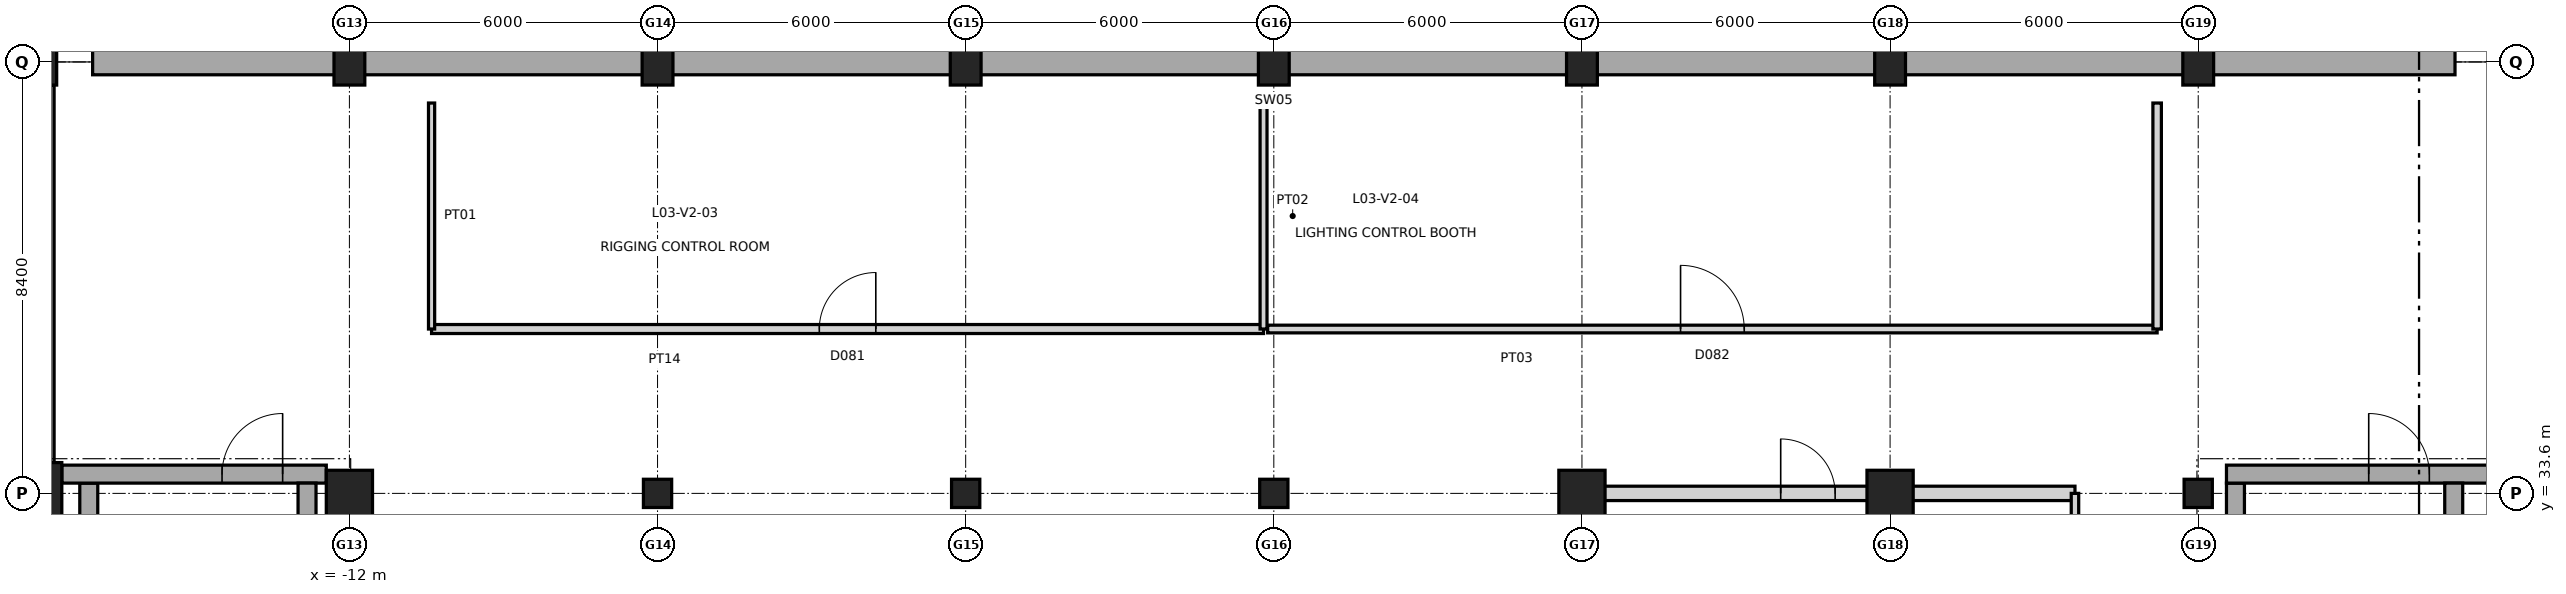
"""IFC4 building model, lengths in metres.
Left out: names, types, materials, properties, quantities, classifications, styles, units other than length and angle.
Written with IfcOpenShell. Run it as: python <this file> out.ifc"""

import sys

from ifc_helpers import new_model, si_unit, direction, frame, frame_2d, origin, origin_2d, place, context, subcontext, project, spatial, rectangle, extrude, element, fill, save


model = new_model("IFC4")
c1 = context("Model", 3, precision=1e-05, world=origin(), true_north=direction((0.0, 1.0)))
c2 = subcontext(c1, "Body", "Model", "MODEL_VIEW")
j1 = project(units=[si_unit("LENGTHUNIT", "METRE"), si_unit("PLANEANGLEUNIT", "RADIAN")], contexts=[c1])
p1 = place(None, origin())
s1 = spatial("IfcSite", under=j1, at=p1, CompositionType="ELEMENT")
p2 = place(p1, origin())
s2 = spatial("IfcBuilding", under=s1, at=p2, CompositionType="ELEMENT")
p3 = place(p2, frame((0.0, 0.0, 15.0)))
s3 = spatial("IfcBuildingStorey", under=s2, at=p3, CompositionType="ELEMENT", Elevation=15.0)
p4 = place(p3, frame((-18.0, 33.6, 0.0), z_axis=(0.0, 0.0, 1.0), x_axis=(1.0, 0.0, 0.0)))
e1 = element("IfcColumn", 1, at=p4, inside=s3, PredefinedType="COLUMN", context=c2, shape_type="SweptSolid", body=[
    extrude(rectangle(XDim=0.8, YDim=1.2, at=origin_2d()), origin(), (0.0, 0.0, 1.0), 4.8),
])
p5 = place(p3, frame((-18.0, 42.0, 0.0), z_axis=(0.0, 0.0, 1.0), x_axis=(1.0, 0.0, 0.0)))
e2 = element("IfcColumn", 2, at=p5, inside=s3, PredefinedType="COLUMN", context=c2, shape_type="SweptSolid", body=[
    extrude(rectangle(XDim=0.6, YDim=0.9, at=origin_2d()), origin(), (0.0, 0.0, 1.0), 4.8),
])
p6 = place(p3, frame((-12.0, 33.6, 0.0), z_axis=(0.0, 0.0, 1.0), x_axis=(1.0, 0.0, 0.0)))
e3 = element("IfcColumn", 3, at=p6, inside=s3, PredefinedType="COLUMN", context=c2, shape_type="SweptSolid", body=[
    extrude(rectangle(XDim=0.9, YDim=0.9, at=origin_2d()), origin(), (0.0, 0.0, 1.0), 4.8),
])
p7 = place(p3, frame((-12.0, 42.0, 0.0), z_axis=(0.0, 0.0, 1.0), x_axis=(1.0, 0.0, 0.0)))
e4 = element("IfcColumn", 4, at=p7, inside=s3, PredefinedType="COLUMN", context=c2, shape_type="SweptSolid", body=[
    extrude(rectangle(XDim=0.6, YDim=0.9, at=origin_2d()), origin(), (0.0, 0.0, 1.0), 4.8),
])
p8 = place(p3, frame((-6.0, 33.6, 0.0), z_axis=(0.0, 0.0, 1.0), x_axis=(1.0, 0.0, 0.0)))
e5 = element("IfcColumn", 5, at=p8, inside=s3, PredefinedType="COLUMN", context=c2, shape_type="SweptSolid", body=[
    extrude(rectangle(XDim=0.55, YDim=0.55, at=origin_2d()), origin(), (0.0, 0.0, 1.0), 4.8),
])
p9 = place(p3, frame((-6.0, 42.0, 0.0), z_axis=(0.0, 0.0, 1.0), x_axis=(1.0, 0.0, 0.0)))
e6 = element("IfcColumn", 6, at=p9, inside=s3, PredefinedType="COLUMN", context=c2, shape_type="SweptSolid", body=[
    extrude(rectangle(XDim=0.6, YDim=0.9, at=origin_2d()), origin(), (0.0, 0.0, 1.0), 4.8),
])
p10 = place(p3, frame((0.0, 33.6, 0.0), z_axis=(0.0, 0.0, 1.0), x_axis=(1.0, 0.0, 0.0)))
e7 = element("IfcColumn", 7, at=p10, inside=s3, PredefinedType="COLUMN", context=c2, shape_type="SweptSolid", body=[
    extrude(rectangle(XDim=0.55, YDim=0.55, at=origin_2d()), origin(), (0.0, 0.0, 1.0), 4.8),
])
p11 = place(p3, frame((0.0, 42.0, 0.0), z_axis=(0.0, 0.0, 1.0), x_axis=(1.0, 0.0, 0.0)))
e8 = element("IfcColumn", 8, at=p11, inside=s3, PredefinedType="COLUMN", context=c2, shape_type="SweptSolid", body=[
    extrude(rectangle(XDim=0.6, YDim=0.9, at=origin_2d()), origin(), (0.0, 0.0, 1.0), 4.8),
])
p12 = place(p3, frame((6.0, 33.6, 0.0), z_axis=(0.0, 0.0, 1.0), x_axis=(1.0, 0.0, 0.0)))
e9 = element("IfcColumn", 9, at=p12, inside=s3, PredefinedType="COLUMN", context=c2, shape_type="SweptSolid", body=[
    extrude(rectangle(XDim=0.55, YDim=0.55, at=origin_2d()), origin(), (0.0, 0.0, 1.0), 4.8),
])
p13 = place(p3, frame((6.0, 42.0, 0.0), z_axis=(0.0, 0.0, 1.0), x_axis=(1.0, 0.0, 0.0)))
e10 = element("IfcColumn", 10, at=p13, inside=s3, PredefinedType="COLUMN", context=c2, shape_type="SweptSolid", body=[
    extrude(rectangle(XDim=0.6, YDim=0.9, at=origin_2d()), origin(), (0.0, 0.0, 1.0), 4.8),
])
p14 = place(p3, frame((12.0, 33.6, 0.0), z_axis=(0.0, 0.0, 1.0), x_axis=(1.0, 0.0, 0.0)))
e11 = element("IfcColumn", 11, at=p14, inside=s3, PredefinedType="COLUMN", context=c2, shape_type="SweptSolid", body=[
    extrude(rectangle(XDim=0.9, YDim=0.9, at=origin_2d()), origin(), (0.0, 0.0, 1.0), 4.8),
])
p15 = place(p3, frame((12.0, 42.0, 0.0), z_axis=(0.0, 0.0, 1.0), x_axis=(1.0, 0.0, 0.0)))
e12 = element("IfcColumn", 12, at=p15, inside=s3, PredefinedType="COLUMN", context=c2, shape_type="SweptSolid", body=[
    extrude(rectangle(XDim=0.6, YDim=0.9, at=origin_2d()), origin(), (0.0, 0.0, 1.0), 4.8),
])
p16 = place(p3, frame((18.0, 33.6, 0.0), z_axis=(0.0, 0.0, 1.0), x_axis=(1.0, 0.0, 0.0)))
e13 = element("IfcColumn", 13, at=p16, inside=s3, PredefinedType="COLUMN", context=c2, shape_type="SweptSolid", body=[
    extrude(rectangle(XDim=0.9, YDim=0.9, at=origin_2d()), origin(), (0.0, 0.0, 1.0), 4.8),
])
p17 = place(p3, frame((18.0, 42.0, 0.0), z_axis=(0.0, 0.0, 1.0), x_axis=(1.0, 0.0, 0.0)))
e14 = element("IfcColumn", 14, at=p17, inside=s3, PredefinedType="COLUMN", context=c2, shape_type="SweptSolid", body=[
    extrude(rectangle(XDim=0.6, YDim=0.9, at=origin_2d()), origin(), (0.0, 0.0, 1.0), 4.8),
])
p18 = place(p3, frame((24.0, 33.6, 0.0), z_axis=(0.0, 0.0, 1.0), x_axis=(1.0, 0.0, 0.0)))
e15 = element("IfcColumn", 15, at=p18, inside=s3, PredefinedType="COLUMN", context=c2, shape_type="SweptSolid", body=[
    extrude(rectangle(XDim=0.55, YDim=0.55, at=origin_2d()), origin(), (0.0, 0.0, 1.0), 4.8),
])
p19 = place(p3, frame((24.0, 42.0, 0.0), z_axis=(0.0, 0.0, 1.0), x_axis=(1.0, 0.0, 0.0)))
e16 = element("IfcColumn", 16, at=p19, inside=s3, PredefinedType="COLUMN", context=c2, shape_type="SweptSolid", body=[
    extrude(rectangle(XDim=0.6, YDim=0.9, at=origin_2d()), origin(), (0.0, 0.0, 1.0), 4.8),
])
p20 = place(p3, frame((-18.0, 18.0, 0.0), z_axis=(0.0, 0.0, 1.0), x_axis=(0.0, 1.0, 0.0)))
e17 = element("IfcWall", 17, at=p20, inside=s3, PredefinedType="SHEAR", context=c2, shape_type="SweptSolid", body=[
    extrude(rectangle(XDim=23.55, YDim=0.5, at=frame_2d((11.775, 0.0))), origin(), (0.0, 0.0, 1.0), 4.8),
])
p21 = place(p3, frame((-17.0, 42.0, 0.0), z_axis=(0.0, 0.0, 1.0), x_axis=(1.0, 0.0, 0.0)))
e18 = element("IfcWall", 18, at=p21, inside=s3, PredefinedType="SHEAR", context=c2, shape_type="SweptSolid", body=[
    extrude(rectangle(XDim=46.0, YDim=0.5, at=frame_2d((23.0, 0.0))), origin(), (0.0, 0.0, 1.0), 4.8),
])
p22 = place(p3, frame((-17.075, 25.5, 0.0), z_axis=(0.0, 0.0, 1.0), x_axis=(0.0, 1.0, 0.0)))
e19 = element("IfcWall", 19, at=p22, inside=s3, PredefinedType="SHEAR", context=c2, shape_type="SweptSolid", body=[
    extrude(rectangle(XDim=8.3, YDim=0.35, at=frame_2d((4.15, 0.0))), origin(), (0.0, 0.0, 1.0), 4.8),
])
p23 = place(p3, frame((-17.6, 33.975, 0.0), z_axis=(0.0, 0.0, 1.0), x_axis=(1.0, 0.0, 0.0)))
e20 = element("IfcWall", 20, at=p23, inside=s3, PredefinedType="SHEAR", context=c2, shape_type="SweptSolid", body=[
    extrude(rectangle(XDim=5.15, YDim=0.35, at=frame_2d((2.575, 0.0))), origin(), (0.0, 0.0, 1.0), 4.8),
])
p24 = place(p23, frame((3.12, 0.0, 0.0)))
e21 = element("IfcOpeningElement", 21, at=p24, cuts=e20, PredefinedType="OPENING", context=c2, shape_type="SweptSolid", body=[
    extrude(rectangle(XDim=1.18, YDim=2.15, at=frame_2d((0.59, 1.075))), frame((0.0, 0.185, 0.0), z_axis=(0.0, -1.0, 0.0), x_axis=(1.0, 0.0, 0.0)), (0.0, 0.0, 1.0), 0.37),
])
for number, where, z_axis, x_axis in (
    (22, (-12.825, 33.8, 0.0), (0.0, 0.0, 1.0), (0.0, -1.0, 0.0)),
    (23, (24.725, 25.5, 0.0), (0.0, 0.0, 1.0), (0.0, 1.0, 0.0)),
):
    element("IfcWall", number, at=place(p3, frame(where, z_axis=z_axis, x_axis=x_axis)), inside=s3, PredefinedType="SHEAR", context=c2, shape_type="SweptSolid", body=[
        extrude(rectangle(XDim=8.3, YDim=0.35, at=frame_2d((4.15, 0.0))), origin(), (0.0, 0.0, 1.0), 4.8),
    ])
p25 = place(p3, frame((24.55, 33.975, 0.0), z_axis=(0.0, 0.0, 1.0), x_axis=(1.0, 0.0, 0.0)))
e24 = element("IfcWall", 24, at=p25, inside=s3, PredefinedType="SHEAR", context=c2, shape_type="SweptSolid", body=[
    extrude(rectangle(XDim=5.15, YDim=0.35, at=frame_2d((2.575, 0.0))), origin(), (0.0, 0.0, 1.0), 4.8),
])
p26 = place(p25, frame((2.77, 0.0, 0.0)))
e25 = element("IfcOpeningElement", 25, at=p26, cuts=e24, PredefinedType="OPENING", context=c2, shape_type="SweptSolid", body=[
    extrude(rectangle(XDim=1.18, YDim=2.15, at=frame_2d((0.59, 1.075))), frame((0.0, 0.185, 0.0), z_axis=(0.0, -1.0, 0.0), x_axis=(1.0, 0.0, 0.0)), (0.0, 0.0, 1.0), 0.37),
])
p27 = place(p3, frame((28.975, 33.8, 0.0), z_axis=(0.0, 0.0, 1.0), x_axis=(0.0, -1.0, 0.0)))
e26 = element("IfcWall", 26, at=p27, inside=s3, PredefinedType="SHEAR", context=c2, shape_type="SweptSolid", body=[
    extrude(rectangle(XDim=8.3, YDim=0.35, at=frame_2d((4.15, 0.0))), origin(), (0.0, 0.0, 1.0), 4.8),
])
p28 = place(p3, frame((12.0, 33.6, 0.0), z_axis=(0.0, 0.0, 1.0), x_axis=(1.0, 0.0, 0.0)))
e27 = element("IfcWall", 27, at=p28, inside=s3, PredefinedType="PARTITIONING", context=c2, shape_type="SweptSolid", body=[
    extrude(rectangle(XDim=9.6, YDim=0.28, at=frame_2d((4.8, 0.0))), origin(), (0.0, 0.0, 1.0), 3.34),
])
p29 = place(p28, frame((3.87, 0.0, 0.0)))
e28 = element("IfcOpeningElement", 28, at=p29, cuts=e27, PredefinedType="OPENING", context=c2, shape_type="SweptSolid", body=[
    extrude(rectangle(XDim=1.06, YDim=2.15, at=frame_2d((0.53, 1.075))), frame((0.0, 0.15, 0.0), z_axis=(0.0, -1.0, 0.0), x_axis=(1.0, 0.0, 0.0)), (0.0, 0.0, 1.0), 0.3),
])
p30 = place(p3, frame((12.0, 24.2, 0.0), z_axis=(0.0, 0.0, 1.0), x_axis=(0.0, 1.0, 0.0)))
e29 = element("IfcWall", 29, at=p30, inside=s3, PredefinedType="PARTITIONING", context=c2, shape_type="SweptSolid", body=[
    extrude(rectangle(XDim=9.4, YDim=0.305, at=frame_2d((4.7, 0.0))), origin(), (0.0, 0.0, 1.0), 3.59),
])
p31 = place(p3, frame((21.6, 24.2, 0.0), z_axis=(0.0, 0.0, 1.0), x_axis=(0.0, 1.0, 0.0)))
e30 = element("IfcWall", 30, at=p31, inside=s3, PredefinedType="PARTITIONING", context=c2, shape_type="SweptSolid", body=[
    extrude(rectangle(XDim=9.4, YDim=0.145, at=frame_2d((4.7, 0.0))), origin(), (0.0, 0.0, 1.0), 4.42),
])
p32 = place(p3, frame((-10.4, 36.8, 0.0), z_axis=(0.0, 0.0, 1.0), x_axis=(1.0, 0.0, 0.0)))
e31 = element("IfcWall", 31, at=p32, inside=s3, PredefinedType="PARTITIONING", context=c2, shape_type="SweptSolid", body=[
    extrude(rectangle(XDim=16.2, YDim=0.175, at=frame_2d((8.1, 0.0))), origin(), (0.0, 0.0, 1.0), 4.42),
])
p33 = place(p32, frame((7.55, 0.0, 0.0)))
e32 = element("IfcOpeningElement", 32, at=p33, cuts=e31, PredefinedType="OPENING", context=c2, shape_type="SweptSolid", body=[
    extrude(rectangle(XDim=1.1, YDim=2.2, at=frame_2d((0.55, 1.1))), frame((0.0, 0.097, 0.0), z_axis=(0.0, -1.0, 0.0), x_axis=(1.0, 0.0, 0.0)), (0.0, 0.0, 1.0), 0.195),
])
p34 = place(p3, frame((-10.4, 36.8, 0.0), z_axis=(0.0, 0.0, 1.0), x_axis=(0.0, 1.0, 0.0)))
e33 = element("IfcWall", 33, at=p34, inside=s3, PredefinedType="PARTITIONING", context=c2, shape_type="SweptSolid", body=[
    extrude(rectangle(XDim=4.4, YDim=0.12, at=frame_2d((2.2, 0.0))), origin(), (0.0, 0.0, 1.0), 4.42),
])
p35 = place(p3, frame((5.8, 36.8, 0.0), z_axis=(0.0, 0.0, 1.0), x_axis=(0.0, 1.0, 0.0)))
e34 = element("IfcWall", 34, at=p35, inside=s3, PredefinedType="PARTITIONING", context=c2, shape_type="SweptSolid", body=[
    extrude(rectangle(XDim=4.4, YDim=0.135, at=frame_2d((2.2, 0.0))), origin(), (0.0, 0.0, 1.0), 3.734),
])
p36 = place(p3, frame((5.88, 36.8, 0.0), z_axis=(0.0, 0.0, 1.0), x_axis=(1.0, 0.0, 0.0)))
e35 = element("IfcWall", 35, at=p36, inside=s3, PredefinedType="PARTITIONING", context=c2, shape_type="SweptSolid", body=[
    extrude(rectangle(XDim=17.32, YDim=0.15, at=frame_2d((8.66, 0.0))), origin(), (0.0, 0.0, 1.0), 4.42),
])
p37 = place(p36, frame((8.04, 0.0, 0.0)))
e36 = element("IfcOpeningElement", 36, at=p37, cuts=e35, PredefinedType="OPENING", context=c2, shape_type="SweptSolid", body=[
    extrude(rectangle(XDim=1.24, YDim=2.2, at=frame_2d((0.62, 1.1))), frame((0.0, 0.085, 0.0), z_axis=(0.0, -1.0, 0.0), x_axis=(1.0, 0.0, 0.0)), (0.0, 0.0, 1.0), 0.17),
])
p38 = place(p3, frame((23.2, 36.8, 0.0), z_axis=(0.0, 0.0, 1.0), x_axis=(0.0, 1.0, 0.0)))
e37 = element("IfcWall", 37, at=p38, inside=s3, PredefinedType="PARTITIONING", context=c2, shape_type="SweptSolid", body=[
    extrude(rectangle(XDim=4.4, YDim=0.165, at=frame_2d((2.2, 0.0))), origin(), (0.0, 0.0, 1.0), 4.42),
])
p39 = place(p24, origin())
e38 = element("IfcDoor", 38, at=p39, inside=s3, OperationType="SINGLE_SWING_RIGHT", PredefinedType="DOOR", context=c2, shape_type="SweptSolid", body=[
    extrude(rectangle(XDim=1.18, YDim=2.15, at=frame_2d((0.59, 1.075))), frame((0.0, 0.025, 0.0), z_axis=(0.0, -1.0, 0.0), x_axis=(1.0, 0.0, 0.0)), (0.0, 0.0, 1.0), 0.05),
])
fill(e21, e38)
p40 = place(p26, origin())
e39 = element("IfcDoor", 39, at=p40, inside=s3, OperationType="SINGLE_SWING_LEFT", PredefinedType="DOOR", context=c2, shape_type="SweptSolid", body=[
    extrude(rectangle(XDim=1.18, YDim=2.15, at=frame_2d((0.59, 1.075))), frame((0.0, 0.025, 0.0), z_axis=(0.0, -1.0, 0.0), x_axis=(1.0, 0.0, 0.0)), (0.0, 0.0, 1.0), 0.05),
])
fill(e25, e39)
p41 = place(p29, origin())
e40 = element("IfcDoor", 40, at=p41, inside=s3, OperationType="SINGLE_SWING_LEFT", PredefinedType="DOOR", context=c2, shape_type="SweptSolid", body=[
    extrude(rectangle(XDim=1.06, YDim=2.15, at=frame_2d((0.53, 1.075))), frame((0.0, 0.025, 0.0), z_axis=(0.0, -1.0, 0.0), x_axis=(1.0, 0.0, 0.0)), (0.0, 0.0, 1.0), 0.05),
])
fill(e28, e40)
p42 = place(p33, origin())
e41 = element("IfcDoor", 41, at=p42, inside=s3, OperationType="SINGLE_SWING_RIGHT", PredefinedType="DOOR", context=c2, shape_type="SweptSolid", body=[
    extrude(rectangle(XDim=1.1, YDim=2.2, at=frame_2d((0.55, 1.1))), frame((0.0, 0.025, 0.0), z_axis=(0.0, -1.0, 0.0), x_axis=(1.0, 0.0, 0.0)), (0.0, 0.0, 1.0), 0.05),
])
fill(e32, e41)
p43 = place(p37, origin())
e42 = element("IfcDoor", 42, at=p43, inside=s3, OperationType="SINGLE_SWING_LEFT", PredefinedType="DOOR", context=c2, shape_type="SweptSolid", body=[
    extrude(rectangle(XDim=1.24, YDim=2.2, at=frame_2d((0.62, 1.1))), frame((0.0, 0.025, 0.0), z_axis=(0.0, -1.0, 0.0), x_axis=(1.0, 0.0, 0.0)), (0.0, 0.0, 1.0), 0.05),
])
fill(e36, e42)
save(model, sys.argv[1])
